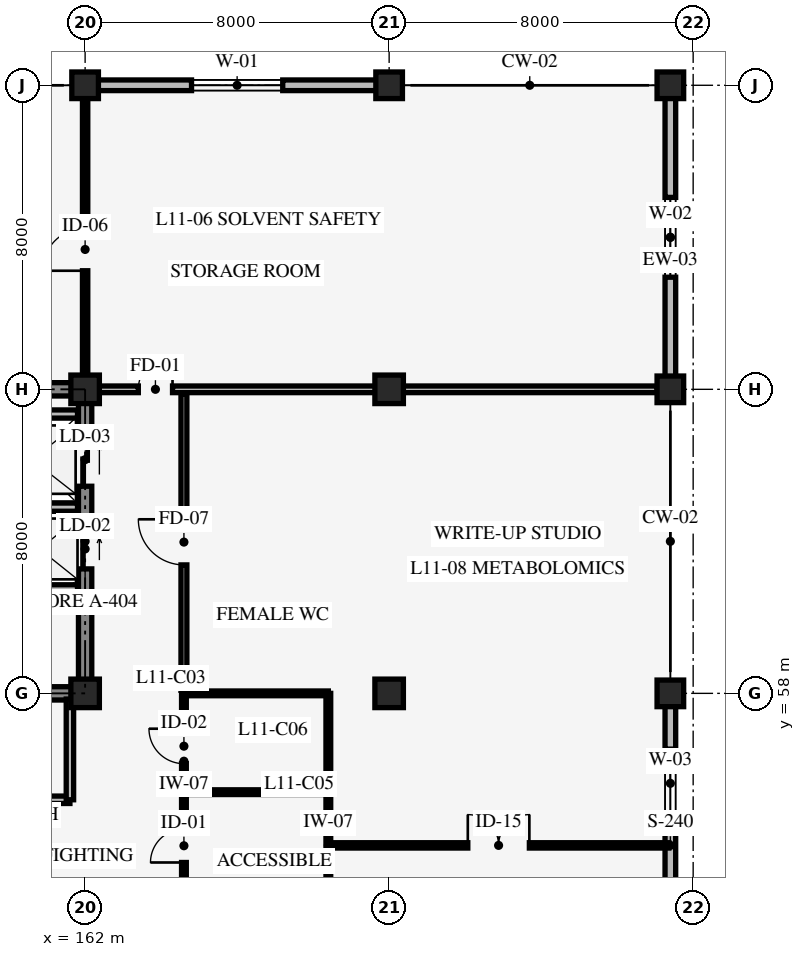
"""IFC4 building model, lengths in metres.
Left out: names, types, materials, properties, quantities, classifications, styles, units other than length and angle.
Written with IfcOpenShell. Run it as: python <this file> out.ifc"""

import sys

from ifc_helpers import new_model, si_unit, direction, frame, frame_2d, origin, origin_2d, place, context, subcontext, project, spatial, rectangle, extrude, element, fill, save


model = new_model("IFC4")
c1 = context("Model", 3, precision=1e-05, world=origin(), true_north=direction((0.0, 1.0)))
c2 = subcontext(c1, "Body", "Model", "MODEL_VIEW")
j1 = project(units=[si_unit("LENGTHUNIT", "METRE"), si_unit("PLANEANGLEUNIT", "RADIAN")], contexts=[c1])
p1 = place(None, origin())
s1 = spatial("IfcSite", under=j1, at=p1, CompositionType="ELEMENT")
p2 = place(p1, origin())
s2 = spatial("IfcBuilding", under=s1, at=p2, CompositionType="ELEMENT")
p3 = place(p2, frame((0.0, 0.0, 44.4)))
s3 = spatial("IfcBuildingStorey", under=s2, at=p3, CompositionType="ELEMENT", Elevation=44.4)
p4 = place(p3, frame((154.0, 58.0, 0.0), z_axis=(0.0, 0.0, 1.0), x_axis=(1.0, 0.0, 0.0)))
e1 = element("IfcWall", 1, at=p4, inside=s3, PredefinedType="SHEAR", context=c2, shape_type="SweptSolid", body=[
    extrude(rectangle(XDim=8.0, YDim=0.35, at=frame_2d((4.0, 0.0))), origin(), (0.0, 0.0, 1.0), 3.95),
])
p5 = place(p4, frame((1.4, 0.0, 0.0)))
e2 = element("IfcOpeningElement", 2, at=p5, cuts=e1, PredefinedType="OPENING", context=c2, shape_type="SweptSolid", body=[
    extrude(rectangle(XDim=1.3, YDim=2.15, at=frame_2d((0.65, 1.075))), frame((0.0, 0.185, 0.0), z_axis=(0.0, -1.0, 0.0), x_axis=(1.0, 0.0, 0.0)), (0.0, 0.0, 1.0), 0.37),
])
p6 = place(p4, frame((5.3, 0.0, 0.0)))
e3 = element("IfcOpeningElement", 3, at=p6, cuts=e1, PredefinedType="OPENING", context=c2, shape_type="SweptSolid", body=[
    extrude(rectangle(XDim=1.1, YDim=2.2, at=frame_2d((0.55, 1.1))), frame((0.0, 0.185, 0.0), z_axis=(0.0, -1.0, 0.0), x_axis=(1.0, 0.0, 0.0)), (0.0, 0.0, 1.0), 0.37),
])
p7 = place(p3, frame((162.0, 58.0, 0.0), z_axis=(0.0, 0.0, 1.0), x_axis=(0.0, 1.0, 0.0)))
e4 = element("IfcWall", 4, at=p7, inside=s3, PredefinedType="SHEAR", context=c2, shape_type="SweptSolid", body=[
    extrude(rectangle(XDim=8.0, YDim=0.35, at=frame_2d((4.0, 0.0))), origin(), (0.0, 0.0, 1.0), 3.95),
])
p8 = place(p7, frame((3.275, 0.0, 0.0)))
e5 = element("IfcOpeningElement", 5, at=p8, cuts=e4, PredefinedType="OPENING", context=c2, shape_type="SweptSolid", body=[
    extrude(rectangle(XDim=1.05, YDim=2.2, at=frame_2d((0.525, 1.1))), frame((0.0, 0.185, 0.0), z_axis=(0.0, -1.0, 0.0), x_axis=(1.0, 0.0, 0.0)), (0.0, 0.0, 1.0), 0.37),
])
p9 = place(p7, frame((5.45, 0.0, 0.0)))
e6 = element("IfcOpeningElement", 6, at=p9, cuts=e4, PredefinedType="OPENING", context=c2, shape_type="SweptSolid", body=[
    extrude(rectangle(XDim=1.4, YDim=2.3, at=frame_2d((0.7, 1.15))), frame((0.0, 0.185, 0.0), z_axis=(0.0, -1.0, 0.0), x_axis=(1.0, 0.0, 0.0)), (0.0, 0.0, 1.0), 0.37),
])
p10 = place(p3, frame((162.0, 66.0, 0.0), z_axis=(0.0, 0.0, 1.0), x_axis=(-1.0, 0.0, 0.0)))
e7 = element("IfcWall", 7, at=p10, inside=s3, PredefinedType="SHEAR", context=c2, shape_type="SweptSolid", body=[
    extrude(rectangle(XDim=8.0, YDim=0.35, at=frame_2d((4.0, 0.0))), origin(), (0.0, 0.0, 1.0), 3.95),
])
for number, where, z_axis, x_axis in (
    (8, (162.0, 58.0, 0.0), (0.0, 0.0, 1.0), (1.0, 0.0, 0.0)),
    (9, (162.0, 66.0, 0.0), (0.0, 0.0, 1.0), (1.0, 0.0, 0.0)),
):
    element("IfcColumn", number, at=place(p3, frame(where, z_axis=z_axis, x_axis=x_axis)), inside=s3, PredefinedType="COLUMN", context=c2, shape_type="SweptSolid", body=[
        extrude(rectangle(XDim=0.75, YDim=0.75, at=origin_2d()), origin(), (0.0, 0.0, 1.0), 4.2),
    ])
p11 = place(p3, frame((162.0, 74.0, 0.0), z_axis=(0.0, 0.0, 1.0), x_axis=(1.0, 0.0, 0.0)))
e10 = element("IfcColumn", 10, at=p11, inside=s3, PredefinedType="COLUMN", context=c2, shape_type="SweptSolid", body=[
    extrude(rectangle(XDim=0.7, YDim=0.7, at=origin_2d()), origin(), (0.0, 0.0, 1.0), 4.2),
])
for number, where, z_axis, x_axis in (
    (11, (170.0, 58.0, 0.0), (0.0, 0.0, 1.0), (1.0, 0.0, 0.0)),
    (12, (170.0, 66.0, 0.0), (0.0, 0.0, 1.0), (1.0, 0.0, 0.0)),
):
    element("IfcColumn", number, at=place(p3, frame(where, z_axis=z_axis, x_axis=x_axis)), inside=s3, PredefinedType="COLUMN", context=c2, shape_type="SweptSolid", body=[
        extrude(rectangle(XDim=0.75, YDim=0.75, at=origin_2d()), origin(), (0.0, 0.0, 1.0), 4.2),
    ])
for number, where, z_axis, x_axis in (
    (13, (170.0, 74.0, 0.0), (0.0, 0.0, 1.0), (1.0, 0.0, 0.0)),
    (14, (177.4, 58.0, 0.0), (0.0, 0.0, 1.0), (1.0, 0.0, 0.0)),
    (15, (177.4, 66.0, 0.0), (0.0, 0.0, 1.0), (1.0, 0.0, 0.0)),
    (16, (177.4, 74.0, 0.0), (0.0, 0.0, 1.0), (1.0, 0.0, 0.0)),
):
    element("IfcColumn", number, at=place(p3, frame(where, z_axis=z_axis, x_axis=x_axis)), inside=s3, PredefinedType="COLUMN", context=c2, shape_type="SweptSolid", body=[
        extrude(rectangle(XDim=0.7, YDim=0.7, at=origin_2d()), origin(), (0.0, 0.0, 1.0), 4.2),
    ])
p12 = place(p3, frame((162.0, 74.0, 0.0), z_axis=(0.0, 0.0, 1.0), x_axis=(1.0, 0.0, 0.0)))
e17 = element("IfcWall", 17, at=p12, inside=s3, PredefinedType="STANDARD", context=c2, shape_type="SweptSolid", body=[
    extrude(rectangle(XDim=8.0, YDim=0.28, at=frame_2d((4.0, 0.0))), origin(), (0.0, 0.0, 1.0), 3.4),
])
p13 = place(p12, frame((2.8, 0.0, 0.85)))
e18 = element("IfcOpeningElement", 18, at=p13, cuts=e17, PredefinedType="OPENING", context=c2, shape_type="SweptSolid", body=[
    extrude(rectangle(XDim=2.4, YDim=1.8, at=frame_2d((1.2, 0.9))), frame((0.0, 0.15, 0.0), z_axis=(0.0, -1.0, 0.0), x_axis=(1.0, 0.0, 0.0)), (0.0, 0.0, 1.0), 0.3),
])
p14 = place(p3, frame((177.4, 74.0, 0.0), z_axis=(0.0, 0.0, 1.0), x_axis=(0.0, -1.0, 0.0)))
e19 = element("IfcWall", 19, at=p14, inside=s3, PredefinedType="STANDARD", context=c2, shape_type="SweptSolid", body=[
    extrude(rectangle(XDim=8.0, YDim=0.28, at=frame_2d((4.0, 0.0))), origin(), (0.0, 0.0, 1.0), 3.4),
])
p15 = place(p14, frame((2.95, 0.0, 0.85)))
e20 = element("IfcOpeningElement", 20, at=p15, cuts=e19, PredefinedType="OPENING", context=c2, shape_type="SweptSolid", body=[
    extrude(rectangle(XDim=2.1, YDim=1.6, at=frame_2d((1.05, 0.8))), frame((0.0, 0.15, 0.0), z_axis=(0.0, -1.0, 0.0), x_axis=(1.0, 0.0, 0.0)), (0.0, 0.0, 1.0), 0.3),
])
p16 = place(p3, frame((177.4, 58.0, 0.0), z_axis=(0.0, 0.0, 1.0), x_axis=(0.0, -1.0, 0.0)))
e21 = element("IfcWall", 21, at=p16, inside=s3, PredefinedType="STANDARD", context=c2, shape_type="SweptSolid", body=[
    extrude(rectangle(XDim=8.0, YDim=0.28, at=frame_2d((4.0, 0.0))), origin(), (0.0, 0.0, 1.0), 3.24),
])
p17 = place(p16, frame((1.467, 0.0, 0.85)))
e22 = element("IfcOpeningElement", 22, at=p17, cuts=e21, PredefinedType="OPENING", context=c2, shape_type="SweptSolid", body=[
    extrude(rectangle(XDim=1.8, YDim=1.4, at=frame_2d((0.9, 0.7))), frame((0.0, 0.15, 0.0), z_axis=(0.0, -1.0, 0.0), x_axis=(1.0, 0.0, 0.0)), (0.0, 0.0, 1.0), 0.3),
])
p18 = place(p3, frame((158.45, 62.9, 0.0), z_axis=(0.0, 0.0, 1.0), x_axis=(1.0, 0.0, 0.0)))
e23 = element("IfcWall", 23, at=p18, inside=s3, PredefinedType="STANDARD", context=c2, shape_type="SweptSolid", body=[
    extrude(rectangle(XDim=3.35, YDim=0.215, at=frame_2d((1.675, 0.0))), origin(), (0.0, 0.0, 1.0), 3.9),
])
p19 = place(p3, frame((159.38, 65.35, 0.0), z_axis=(0.0, 0.0, 1.0), x_axis=(1.0, 0.0, 0.0)))
e24 = element("IfcWall", 24, at=p19, inside=s3, PredefinedType="STANDARD", context=c2, shape_type="SweptSolid", body=[
    extrude(rectangle(XDim=2.42, YDim=0.215, at=frame_2d((1.21, 0.0))), origin(), (0.0, 0.0, 1.0), 3.9),
])
p20 = place(p3, frame((158.45, 60.75, 0.0), z_axis=(0.0, 0.0, 1.0), x_axis=(1.0, 0.0, 0.0)))
e25 = element("IfcWall", 25, at=p20, inside=s3, PredefinedType="STANDARD", context=c2, shape_type="SweptSolid", body=[
    extrude(rectangle(XDim=3.35, YDim=0.215, at=frame_2d((1.675, 0.0))), origin(), (0.0, 0.0, 1.0), 3.9),
])
p21 = place(p3, frame((154.0, 55.2, 0.0), z_axis=(0.0, 0.0, 1.0), x_axis=(1.0, 0.0, 0.0)))
e26 = element("IfcWall", 26, at=p21, inside=s3, PredefinedType="STANDARD", context=c2, shape_type="SweptSolid", body=[
    extrude(rectangle(XDim=7.6, YDim=0.195, at=frame_2d((3.8, 0.0))), origin(), (0.0, 0.0, 1.0), 3.9),
])
p22 = place(p21, frame((2.8, 0.0, 0.0)))
e27 = element("IfcOpeningElement", 27, at=p22, cuts=e26, PredefinedType="OPENING", context=c2, shape_type="SweptSolid", body=[
    extrude(rectangle(XDim=1.25, YDim=2.15, at=frame_2d((0.625, 1.075))), frame((0.0, 0.107, 0.0), z_axis=(0.0, -1.0, 0.0), x_axis=(1.0, 0.0, 0.0)), (0.0, 0.0, 1.0), 0.215),
])
p23 = place(p3, frame((161.6, 55.2, 0.0), z_axis=(0.0, 0.0, 1.0), x_axis=(0.0, 1.0, 0.0)))
e28 = element("IfcWall", 28, at=p23, inside=s3, PredefinedType="STANDARD", context=c2, shape_type="SweptSolid", body=[
    extrude(rectangle(XDim=2.65, YDim=0.195, at=frame_2d((1.325, 0.0))), origin(), (0.0, 0.0, 1.0), 3.24),
])
p24 = place(p3, frame((164.6, 50.0, 0.0), z_axis=(0.0, 0.0, 1.0), x_axis=(0.0, 1.0, 0.0)))
e29 = element("IfcWall", 29, at=p24, inside=s3, PredefinedType="STANDARD", context=c2, shape_type="SweptSolid", body=[
    extrude(rectangle(XDim=8.0, YDim=0.125, at=frame_2d((4.0, 0.0))), origin(), (0.0, 0.0, 1.0), 3.9),
])
p25 = place(p24, frame((0.9, 0.0, 0.0)))
e30 = element("IfcOpeningElement", 30, at=p25, cuts=e29, PredefinedType="OPENING", context=c2, shape_type="SweptSolid", body=[
    extrude(rectangle(XDim=0.96, YDim=2.08, at=frame_2d((0.48, 1.04))), frame((0.0, 0.073, 0.0), z_axis=(0.0, -1.0, 0.0), x_axis=(1.0, 0.0, 0.0)), (0.0, 0.0, 1.0), 0.145),
])
p26 = place(p24, frame((3.55, 0.0, 0.0)))
e31 = element("IfcOpeningElement", 31, at=p26, cuts=e29, PredefinedType="OPENING", context=c2, shape_type="SweptSolid", body=[
    extrude(rectangle(XDim=0.88, YDim=2.05, at=frame_2d((0.44, 1.025))), frame((0.0, 0.073, 0.0), z_axis=(0.0, -1.0, 0.0), x_axis=(1.0, 0.0, 0.0)), (0.0, 0.0, 1.0), 0.145),
])
p27 = place(p24, frame((6.15, 0.0, 0.0)))
e32 = element("IfcOpeningElement", 32, at=p27, cuts=e29, PredefinedType="OPENING", context=c2, shape_type="SweptSolid", body=[
    extrude(rectangle(XDim=0.92, YDim=2.05, at=frame_2d((0.46, 1.025))), frame((0.0, 0.073, 0.0), z_axis=(0.0, -1.0, 0.0), x_axis=(1.0, 0.0, 0.0)), (0.0, 0.0, 1.0), 0.145),
])
p28 = place(p3, frame((168.4, 50.0, 0.0), z_axis=(0.0, 0.0, 1.0), x_axis=(0.0, 1.0, 0.0)))
e33 = element("IfcWall", 33, at=p28, inside=s3, PredefinedType="STANDARD", context=c2, shape_type="SweptSolid", body=[
    extrude(rectangle(XDim=8.0, YDim=0.125, at=frame_2d((4.0, 0.0))), origin(), (0.0, 0.0, 1.0), 3.9),
])
p29 = place(p3, frame((164.6, 55.4, 0.0), z_axis=(0.0, 0.0, 1.0), x_axis=(1.0, 0.0, 0.0)))
e34 = element("IfcWall", 34, at=p29, inside=s3, PredefinedType="STANDARD", context=c2, shape_type="SweptSolid", body=[
    extrude(rectangle(XDim=3.8, YDim=0.125, at=frame_2d((1.9, 0.0))), origin(), (0.0, 0.0, 1.0), 3.9),
])
p30 = place(p3, frame((164.6, 58.0, 0.0), z_axis=(0.0, 0.0, 1.0), x_axis=(1.0, 0.0, 0.0)))
e35 = element("IfcWall", 35, at=p30, inside=s3, PredefinedType="STANDARD", context=c2, shape_type="SweptSolid", body=[
    extrude(rectangle(XDim=3.8, YDim=0.125, at=frame_2d((1.9, 0.0))), origin(), (0.0, 0.0, 1.0), 3.19),
])
p31 = place(p3, frame((168.4, 54.0, 0.0), z_axis=(0.0, 0.0, 1.0), x_axis=(1.0, 0.0, 0.0)))
e36 = element("IfcWall", 36, at=p31, inside=s3, PredefinedType="STANDARD", context=c2, shape_type="SweptSolid", body=[
    extrude(rectangle(XDim=8.96, YDim=0.14, at=frame_2d((4.48, 0.0))), origin(), (0.0, 0.0, 1.0), 3.9),
])
p32 = place(p31, frame((3.67, 0.0, 0.0)))
e37 = element("IfcOpeningElement", 37, at=p32, cuts=e36, PredefinedType="OPENING", context=c2, shape_type="SweptSolid", body=[
    extrude(rectangle(XDim=1.62, YDim=2.22, at=frame_2d((0.81, 1.11))), frame((0.0, 0.08, 0.0), z_axis=(0.0, -1.0, 0.0), x_axis=(1.0, 0.0, 0.0)), (0.0, 0.0, 1.0), 0.16),
])
p33 = place(p3, frame((164.6, 58.08, 0.0), z_axis=(0.0, 0.0, 1.0), x_axis=(0.0, 1.0, 0.0)))
e38 = element("IfcWall", 38, at=p33, inside=s3, PredefinedType="STANDARD", context=c2, shape_type="SweptSolid", body=[
    extrude(rectangle(XDim=7.8, YDim=0.155, at=frame_2d((3.9, 0.0))), origin(), (0.0, 0.0, 1.0), 3.9),
])
p34 = place(p33, frame((3.3, 0.0, 0.0)))
e39 = element("IfcOpeningElement", 39, at=p34, cuts=e38, PredefinedType="OPENING", context=c2, shape_type="SweptSolid", body=[
    extrude(rectangle(XDim=1.2, YDim=2.1, at=frame_2d((0.6, 1.05))), frame((0.0, 0.087, 0.0), z_axis=(0.0, -1.0, 0.0), x_axis=(1.0, 0.0, 0.0)), (0.0, 0.0, 1.0), 0.175),
])
p35 = place(p3, frame((162.0, 66.12, 0.0), z_axis=(0.0, 0.0, 1.0), x_axis=(0.0, 1.0, 0.0)))
e40 = element("IfcWall", 40, at=p35, inside=s3, PredefinedType="STANDARD", context=c2, shape_type="SweptSolid", body=[
    extrude(rectangle(XDim=7.83, YDim=0.14, at=frame_2d((3.915, 0.0))), origin(), (0.0, 0.0, 1.0), 3.9),
])
p36 = place(p35, frame((3.0, 0.0, 0.0)))
e41 = element("IfcOpeningElement", 41, at=p36, cuts=e40, PredefinedType="OPENING", context=c2, shape_type="SweptSolid", body=[
    extrude(rectangle(XDim=1.12, YDim=2.12, at=frame_2d((0.56, 1.06))), frame((0.0, 0.08, 0.0), z_axis=(0.0, -1.0, 0.0), x_axis=(1.0, 0.0, 0.0)), (0.0, 0.0, 1.0), 0.16),
])
p37 = place(p3, frame((162.35, 66.0, 0.0), z_axis=(0.0, 0.0, 1.0), x_axis=(1.0, 0.0, 0.0)))
e42 = element("IfcWall", 42, at=p37, inside=s3, PredefinedType="STANDARD", context=c2, shape_type="SweptSolid", body=[
    extrude(rectangle(XDim=14.7, YDim=0.175, at=frame_2d((7.35, 0.0))), origin(), (0.0, 0.0, 1.0), 3.19),
])
p38 = place(p37, frame((1.05, 0.0, 0.0)))
e43 = element("IfcOpeningElement", 43, at=p38, cuts=e42, PredefinedType="OPENING", context=c2, shape_type="SweptSolid", body=[
    extrude(rectangle(XDim=0.9, YDim=2.1, at=frame_2d((0.45, 1.05))), frame((0.0, 0.098, 0.0), z_axis=(0.0, -1.0, 0.0), x_axis=(1.0, 0.0, 0.0)), (0.0, 0.0, 1.0), 0.195),
])
p39 = place(p13, origin())
e44 = element("IfcWindow", 44, at=p39, inside=s3, PartitioningType="SINGLE_PANEL", PredefinedType="WINDOW", context=c2, shape_type="SweptSolid", body=[
    extrude(rectangle(XDim=2.4, YDim=1.8, at=frame_2d((1.2, 0.9))), frame((0.0, 0.03, 0.0), z_axis=(0.0, -1.0, 0.0), x_axis=(1.0, 0.0, 0.0)), (0.0, 0.0, 1.0), 0.06),
])
fill(e18, e44)
p40 = place(p15, origin())
e45 = element("IfcWindow", 45, at=p40, inside=s3, PartitioningType="SINGLE_PANEL", PredefinedType="WINDOW", context=c2, shape_type="SweptSolid", body=[
    extrude(rectangle(XDim=2.1, YDim=1.6, at=frame_2d((1.05, 0.8))), frame((0.0, 0.03, 0.0), z_axis=(0.0, -1.0, 0.0), x_axis=(1.0, 0.0, 0.0)), (0.0, 0.0, 1.0), 0.06),
])
fill(e20, e45)
p41 = place(p17, origin())
e46 = element("IfcWindow", 46, at=p41, inside=s3, PartitioningType="SINGLE_PANEL", PredefinedType="WINDOW", context=c2, shape_type="SweptSolid", body=[
    extrude(rectangle(XDim=1.8, YDim=1.4, at=frame_2d((0.9, 0.7))), frame((0.0, 0.03, 0.0), z_axis=(0.0, -1.0, 0.0), x_axis=(1.0, 0.0, 0.0)), (0.0, 0.0, 1.0), 0.06),
])
fill(e22, e46)
p42 = place(p8, origin())
e47 = element("IfcDoor", 47, at=p42, inside=s3, OperationType="SLIDING_TO_RIGHT", PredefinedType="DOOR", context=c2, shape_type="SweptSolid", body=[
    extrude(rectangle(XDim=1.05, YDim=2.2, at=frame_2d((0.525, 1.1))), frame((0.0, 0.025, 0.0), z_axis=(0.0, -1.0, 0.0), x_axis=(1.0, 0.0, 0.0)), (0.0, 0.0, 1.0), 0.05),
])
fill(e5, e47)
p43 = place(p9, origin())
e48 = element("IfcDoor", 48, at=p43, inside=s3, OperationType="DOUBLE_DOOR_SLIDING", PredefinedType="DOOR", context=c2, shape_type="SweptSolid", body=[
    extrude(rectangle(XDim=1.4, YDim=2.3, at=frame_2d((0.7, 1.15))), frame((0.0, 0.025, 0.0), z_axis=(0.0, -1.0, 0.0), x_axis=(1.0, 0.0, 0.0)), (0.0, 0.0, 1.0), 0.05),
])
fill(e6, e48)
p44 = place(p26, origin())
e49 = element("IfcDoor", 49, at=p44, inside=s3, OperationType="SINGLE_SWING_LEFT", PredefinedType="DOOR", context=c2, shape_type="SweptSolid", body=[
    extrude(rectangle(XDim=0.88, YDim=2.05, at=frame_2d((0.44, 1.025))), frame((0.0, 0.025, 0.0), z_axis=(0.0, -1.0, 0.0), x_axis=(1.0, 0.0, 0.0)), (0.0, 0.0, 1.0), 0.05),
])
fill(e31, e49)
p45 = place(p27, origin())
e50 = element("IfcDoor", 50, at=p45, inside=s3, OperationType="SINGLE_SWING_RIGHT", PredefinedType="DOOR", context=c2, shape_type="SweptSolid", body=[
    extrude(rectangle(XDim=0.92, YDim=2.05, at=frame_2d((0.46, 1.025))), frame((0.0, 0.025, 0.0), z_axis=(0.0, -1.0, 0.0), x_axis=(1.0, 0.0, 0.0)), (0.0, 0.0, 1.0), 0.05),
])
fill(e32, e50)
p46 = place(p32, origin())
e51 = element("IfcDoor", 51, at=p46, inside=s3, OperationType="DOUBLE_DOOR_SINGLE_SWING", PredefinedType="DOOR", context=c2, shape_type="SweptSolid", body=[
    extrude(rectangle(XDim=1.62, YDim=2.22, at=frame_2d((0.81, 1.11))), frame((0.0, 0.025, 0.0), z_axis=(0.0, -1.0, 0.0), x_axis=(1.0, 0.0, 0.0)), (0.0, 0.0, 1.0), 0.05),
])
fill(e37, e51)
p47 = place(p34, origin())
e52 = element("IfcDoor", 52, at=p47, inside=s3, OperationType="SINGLE_SWING_RIGHT", PredefinedType="DOOR", context=c2, shape_type="SweptSolid", body=[
    extrude(rectangle(XDim=1.2, YDim=2.1, at=frame_2d((0.6, 1.05))), frame((0.0, 0.025, 0.0), z_axis=(0.0, -1.0, 0.0), x_axis=(1.0, 0.0, 0.0)), (0.0, 0.0, 1.0), 0.05),
])
fill(e39, e52)
p48 = place(p36, origin())
e53 = element("IfcDoor", 53, at=p48, inside=s3, OperationType="SINGLE_SWING_LEFT", PredefinedType="DOOR", context=c2, shape_type="SweptSolid", body=[
    extrude(rectangle(XDim=1.12, YDim=2.12, at=frame_2d((0.56, 1.06))), frame((0.0, 0.025, 0.0), z_axis=(0.0, -1.0, 0.0), x_axis=(1.0, 0.0, 0.0)), (0.0, 0.0, 1.0), 0.05),
])
fill(e41, e53)
p49 = place(p38, origin())
e54 = element("IfcDoor", 54, at=p49, inside=s3, OperationType="SINGLE_SWING_RIGHT", PredefinedType="DOOR", context=c2, shape_type="SweptSolid", body=[
    extrude(rectangle(XDim=0.9, YDim=2.1, at=frame_2d((0.45, 1.05))), frame((0.0, 0.025, 0.0), z_axis=(0.0, -1.0, 0.0), x_axis=(1.0, 0.0, 0.0)), (0.0, 0.0, 1.0), 0.05),
])
fill(e43, e54)
save(model, sys.argv[1])
